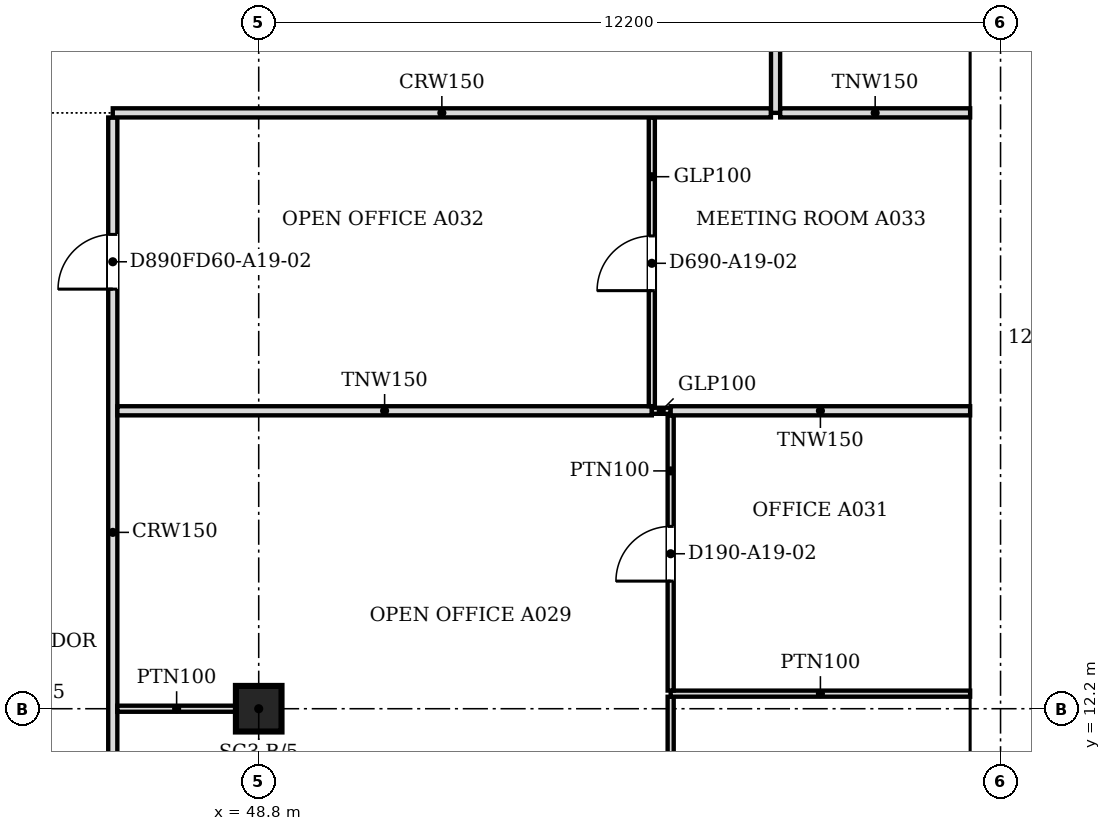
"""IFC4 building model, lengths in metres.
Left out: names, types, materials, properties, quantities, classifications, styles, units other than length and angle.
Written with IfcOpenShell. Run it as: python <this file> out.ifc"""

import sys

from ifc_helpers import new_model, si_unit, direction, frame, frame_2d, origin, origin_2d, place, context, subcontext, project, spatial, polyline, rectangle, outline, extrude, faceted_brep, source, transform, mapped, element, fill, save


model = new_model("IFC4")
c1 = context("Model", 3, precision=1e-05, world=origin(), true_north=direction((0.0, 1.0)))
c2 = subcontext(c1, "Body", "Model", "MODEL_VIEW")
j1 = project(units=[si_unit("LENGTHUNIT", "METRE"), si_unit("PLANEANGLEUNIT", "RADIAN")], contexts=[c1])
p1 = place(None, origin())
s1 = spatial("IfcSite", under=j1, at=p1, CompositionType="ELEMENT")
p2 = place(p1, origin())
s2 = spatial("IfcBuilding", under=s1, at=p2, CompositionType="ELEMENT")
p3 = place(p2, frame((0.0, 0.0, 216.9)))
s3 = spatial("IfcBuildingStorey", under=s2, at=p3, CompositionType="ELEMENT", Elevation=216.9)
p4 = place(p3, frame((48.8, 12.2, 0.0), z_axis=(0.0, 0.0, 1.0), x_axis=(1.0, 0.0, 0.0)))
e1 = element("IfcColumn", 1, at=p4, inside=s3, PredefinedType="COLUMN", context=c2, shape_type="SweptSolid", body=[
    extrude(rectangle(XDim=0.75, YDim=0.75, at=origin_2d()), origin(), (0.0, 0.0, 1.0), 3.6),
])
m1 = source(origin(), c2, "Body", "SweptSolid", [
    extrude(outline(polyline([(3.05, 0.0), (6.1, 3.8), (3.05, 7.6), (0.0, 3.8), (3.05, 0.0)])), frame((0.0, 0.25, 0.0), z_axis=(0.0, -1.0, 0.0), x_axis=(1.0, 0.0, 0.0)), (0.0, 0.0, 1.0), 0.5),
])
p5 = place(p3, frame((60.75, 9.15, -3.8), z_axis=(0.0, 0.0, 1.0), x_axis=(0.0, 1.0, 0.0)))
e2 = element("IfcWall", 2, at=p5, inside=s3, PredefinedType="SOLIDWALL", context=c2, shape_type="MappedRepresentation", body=[
    mapped(m1, transform((0.0, 0.0, 0.0), scale=1.0)),
])
m2 = source(origin(), c2, "Body", "SweptSolid", [
    extrude(outline(polyline([(3.05, 0.399), (5.78, 3.8), (3.05, 7.2), (0.321, 3.8), (3.05, 0.399)])), frame((0.0, 0.26, 0.0), z_axis=(0.0, -1.0, 0.0), x_axis=(1.0, 0.0, 0.0)), (0.0, 0.0, 1.0), 0.52),
])
p6 = place(p5, origin())
e3 = element("IfcOpeningElement", 3, at=p6, cuts=e2, PredefinedType="OPENING", context=c2, shape_type="MappedRepresentation", body=[
    mapped(m2, transform((0.0, 0.0, 0.0), scale=1.0)),
])
p7 = place(p3, frame((60.75, 15.25, -3.8), z_axis=(0.0, 0.0, 1.0), x_axis=(0.0, 1.0, 0.0)))
e4 = element("IfcWall", 4, at=p7, inside=s3, PredefinedType="SOLIDWALL", context=c2, shape_type="MappedRepresentation", body=[
    mapped(m1, transform((0.0, 0.0, 0.0), scale=1.0)),
])
p8 = place(p7, origin())
e5 = element("IfcOpeningElement", 5, at=p8, cuts=e4, PredefinedType="OPENING", context=c2, shape_type="MappedRepresentation", body=[
    mapped(m2, transform((0.0, 0.0, 0.0), scale=1.0)),
])
m3 = source(origin(), c2, "Body", "Brep", [
    faceted_brep([(3.05, -0.25, 0.0), (6.1, -0.25, 3.8), (6.1, -0.25, 3.8), (3.05, -0.25, 7.6), (0.0, -0.25, 3.8), (0.0, 0.25, 3.8), (3.05, 0.25, 7.6), (6.1, 0.25, 3.8), (6.1, 0.25, 3.8), (3.05, 0.25, 0.0)], [[[0, 1, 2, 3, 4]], [[5, 6, 7, 8, 9]], [[9, 8, 1, 0]], [[7, 6, 3, 2]], [[6, 5, 4, 3]], [[5, 9, 0, 4]], [[1, 8, 7, 2]]]),
])
p9 = place(p3, frame((60.75, 21.35, -3.8), z_axis=(0.0, 0.0, 1.0), x_axis=(0.0, 1.0, 0.0)))
e6 = element("IfcWall", 6, at=p9, inside=s3, PredefinedType="SOLIDWALL", context=c2, shape_type="MappedRepresentation", body=[
    mapped(m3, transform((0.0, 0.0, 0.0), scale=1.0)),
])
p10 = place(p9, origin())
e7 = element("IfcOpeningElement", 7, at=p10, cuts=e6, PredefinedType="OPENING", context=c2, shape_type="MappedRepresentation", body=[
    mapped(m2, transform((0.0, 0.0, 0.0), scale=1.0)),
])
p11 = place(p2, frame((0.0, 0.0, 220.7)))
s4 = spatial("IfcBuildingStorey", under=s2, at=p11, CompositionType="ELEMENT", Elevation=220.7)
m4 = source(origin(), c2, "Body", "Brep", [
    faceted_brep([(3.003, -0.25, 0.0), (6.053, -0.25, 3.8), (3.003, -0.25, 7.6), (0.0, -0.25, 3.8), (0.047, 0.25, 3.859), (3.003, 0.25, 7.6), (6.053, 0.25, 3.8), (3.003, 0.25, 0.0), (0.047, 0.25, 3.741), (0.0, 0.0, 3.8)], [[[0, 1, 2, 3]], [[4, 5, 6, 7, 8]], [[7, 6, 1, 0]], [[6, 5, 2, 1]], [[5, 4, 9, 3, 2]], [[8, 7, 0, 3, 9]], [[8, 9, 4]]]),
])
p12 = place(p11, frame((60.75, 6.146, -3.8), z_axis=(0.0, 0.0, 1.0), x_axis=(0.0, 1.0, 0.0)))
e8 = element("IfcWall", 8, at=p12, inside=s4, PredefinedType="SOLIDWALL", context=c2, shape_type="MappedRepresentation", body=[
    mapped(m4, transform((0.0, 0.0, 0.0), scale=1.0)),
])
m5 = source(origin(), c2, "Body", "SweptSolid", [
    extrude(outline(polyline([(3.005, 0.401), (5.733, 3.8), (3.005, 7.199), (0.319, 3.8), (3.005, 0.401)])), frame((0.0, 0.26, 0.0), z_axis=(0.0, -1.0, 0.0), x_axis=(1.0, 0.0, 0.0)), (0.0, 0.0, 1.0), 0.52),
])
p13 = place(p12, origin())
e9 = element("IfcOpeningElement", 9, at=p13, cuts=e8, PredefinedType="OPENING", context=c2, shape_type="MappedRepresentation", body=[
    mapped(m5, transform((0.0, 0.0, 0.0), scale=1.0)),
])
m6 = source(origin(), c2, "Body", "SweptSolid", [
    extrude(outline(polyline([(3.05, 0.0), (6.1, 3.8), (3.05, 7.6), (0.0, 3.8), (3.05, 0.0)])), frame((0.0, 0.25, 0.0), z_axis=(0.0, -1.0, 0.0), x_axis=(1.0, 0.0, 0.0)), (0.0, 0.0, 1.0), 0.5),
])
p14 = place(p11, frame((60.75, 12.2, -3.8), z_axis=(0.0, 0.0, 1.0), x_axis=(0.0, 1.0, 0.0)))
e10 = element("IfcWall", 10, at=p14, inside=s4, PredefinedType="SOLIDWALL", context=c2, shape_type="MappedRepresentation", body=[
    mapped(m6, transform((0.0, 0.0, 0.0), scale=1.0)),
])
m7 = source(origin(), c2, "Body", "SweptSolid", [
    extrude(outline(polyline([(3.05, 0.399), (5.78, 3.8), (3.05, 7.201), (0.321, 3.8), (3.05, 0.399)])), frame((0.0, 0.26, 0.0), z_axis=(0.0, -1.0, 0.0), x_axis=(1.0, 0.0, 0.0)), (0.0, 0.0, 1.0), 0.52),
])
p15 = place(p14, origin())
e11 = element("IfcOpeningElement", 11, at=p15, cuts=e10, PredefinedType="OPENING", context=c2, shape_type="MappedRepresentation", body=[
    mapped(m7, transform((0.0, 0.0, 0.0), scale=1.0)),
])
m8 = source(origin(), c2, "Body", "Brep", [
    faceted_brep([(3.05, -0.25, 0.0), (6.1, -0.25, 3.8), (6.1, -0.25, 3.8), (3.05, -0.25, 7.6), (0.0, -0.25, 3.8), (0.0, 0.25, 3.8), (3.05, 0.25, 7.6), (6.1, 0.25, 3.8), (6.1, 0.25, 3.8), (3.05, 0.25, 0.0)], [[[0, 1, 2, 3, 4]], [[5, 6, 7, 8, 9]], [[9, 8, 1, 0]], [[7, 6, 3, 2]], [[6, 5, 4, 3]], [[5, 9, 0, 4]], [[1, 8, 7, 2]]]),
])
p16 = place(p11, frame((60.75, 18.3, -3.8), z_axis=(0.0, 0.0, 1.0), x_axis=(0.0, 1.0, 0.0)))
e12 = element("IfcWall", 12, at=p16, inside=s4, PredefinedType="SOLIDWALL", context=c2, shape_type="MappedRepresentation", body=[
    mapped(m8, transform((0.0, 0.0, 0.0), scale=1.0)),
])
p17 = place(p16, origin())
e13 = element("IfcOpeningElement", 13, at=p17, cuts=e12, PredefinedType="OPENING", context=c2, shape_type="MappedRepresentation", body=[
    mapped(m7, transform((0.0, 0.0, 0.0), scale=1.0)),
])
p18 = place(p3, frame((46.4, 21.924, 0.0), z_axis=(0.0, 0.0, 1.0), x_axis=(0.0, -1.0, 0.0)))
e14 = element("IfcWall", 14, at=p18, inside=s3, PredefinedType="PARTITIONING", context=c2, shape_type="SweptSolid", body=[
    extrude(rectangle(XDim=17.724, YDim=0.15, at=frame_2d((8.862, 0.0))), origin(), (0.0, 0.0, 1.0), 3.067),
])
m9 = source(origin(), c2, "Body", "SweptSolid", [
    extrude(rectangle(XDim=0.9, YDim=2.1, at=frame_2d((0.45, 1.05))), frame((0.0, 0.085, 0.0), z_axis=(0.0, -1.0, 0.0), x_axis=(1.0, 0.0, 0.0)), (0.0, 0.0, 1.0), 0.17),
])
p19 = place(p18, frame((1.923, 0.0, 0.0)))
e15 = element("IfcOpeningElement", 15, at=p19, cuts=e14, PredefinedType="OPENING", context=c2, shape_type="MappedRepresentation", body=[
    mapped(m9, transform((0.0, 0.0, 0.0), scale=1.0)),
])
p20 = place(p18, frame((10.824, 0.0, 0.0)))
e16 = element("IfcOpeningElement", 16, at=p20, cuts=e14, PredefinedType="OPENING", context=c2, shape_type="MappedRepresentation", body=[
    mapped(m9, transform((0.0, 0.0, 0.0), scale=1.0)),
])
p21 = place(p3, frame((55.575, 12.397, 0.0), z_axis=(0.0, 0.0, 1.0), x_axis=(0.0, -1.0, 0.0)))
e17 = element("IfcWall", 17, at=p21, inside=s3, PredefinedType="PARTITIONING", context=c2, shape_type="SweptSolid", body=[
    extrude(rectangle(XDim=4.297, YDim=0.1, at=frame_2d((2.148, 0.0))), origin(), (0.0, 0.0, 1.0), 3.067),
])
m10 = source(origin(), c2, "Body", "SweptSolid", [
    extrude(rectangle(XDim=0.9, YDim=2.1, at=frame_2d((0.45, 1.05))), frame((0.0, 0.06, 0.0), z_axis=(0.0, -1.0, 0.0), x_axis=(1.0, 0.0, 0.0)), (0.0, 0.0, 1.0), 0.12),
])
p22 = place(p21, frame((1.697, 0.0, 0.0)))
e18 = element("IfcOpeningElement", 18, at=p22, cuts=e17, PredefinedType="OPENING", context=c2, shape_type="MappedRepresentation", body=[
    mapped(m10, transform((0.0, 0.0, 0.0), scale=1.0)),
])
p23 = place(p3, frame((48.425, 12.2, 0.0), z_axis=(0.0, 0.0, 1.0), x_axis=(-1.0, 0.0, 0.0)))
e19 = element("IfcWall", 19, at=p23, inside=s3, PredefinedType="PARTITIONING", context=c2, shape_type="SweptSolid", body=[
    extrude(rectangle(XDim=1.95, YDim=0.1, at=frame_2d((0.975, 0.0))), origin(), (0.0, 0.0, 1.0), 3.067),
])
p24 = place(p3, frame((55.575, 12.448, 0.0), z_axis=(0.0, 0.0, 1.0), x_axis=(1.0, 0.0, 0.0)))
e20 = element("IfcWall", 20, at=p24, inside=s3, PredefinedType="PARTITIONING", context=c2, shape_type="SweptSolid", body=[
    extrude(rectangle(XDim=4.925, YDim=0.1, at=frame_2d((2.462, 0.0))), origin(), (0.0, 0.0, 1.0), 3.067),
])
p25 = place(p3, frame((55.575, 17.024, 0.0), z_axis=(0.0, 0.0, 1.0), x_axis=(0.0, -1.0, 0.0)))
e21 = element("IfcWall", 21, at=p25, inside=s3, PredefinedType="PARTITIONING", context=c2, shape_type="SweptSolid", body=[
    extrude(rectangle(XDim=4.525, YDim=0.1, at=frame_2d((2.263, 0.0))), origin(), (0.0, 0.0, 1.0), 3.067),
])
p26 = place(p25, frame((1.825, 0.0, 0.0)))
e22 = element("IfcOpeningElement", 22, at=p26, cuts=e21, PredefinedType="OPENING", context=c2, shape_type="MappedRepresentation", body=[
    mapped(m10, transform((0.0, 0.0, 0.0), scale=1.0)),
])
p27 = place(p3, frame((46.476, 17.1, 0.0), z_axis=(0.0, 0.0, 1.0), x_axis=(1.0, 0.0, 0.0)))
e23 = element("IfcWall", 23, at=p27, inside=s3, PredefinedType="PARTITIONING", context=c2, shape_type="SweptSolid", body=[
    extrude(rectangle(XDim=8.789, YDim=0.15, at=frame_2d((4.395, 0.0))), origin(), (0.0, 0.0, 1.0), 3.067),
])
p28 = place(p3, frame((55.266, 17.1, 0.0), z_axis=(0.0, 0.0, 1.0), x_axis=(1.0, 0.0, 0.0)))
e24 = element("IfcWall", 24, at=p28, inside=s3, PredefinedType="PARTITIONING", context=c2, shape_type="SweptSolid", body=[
    extrude(rectangle(XDim=0.308, YDim=0.1, at=frame_2d((0.154, 0.0))), origin(), (0.0, 0.0, 1.0), 3.067),
])
p29 = place(p3, frame((55.575, 17.1, 0.0), z_axis=(0.0, 0.0, 1.0), x_axis=(1.0, 0.0, 0.0)))
e25 = element("IfcWall", 25, at=p29, inside=s3, PredefinedType="PARTITIONING", context=c2, shape_type="SweptSolid", body=[
    extrude(rectangle(XDim=4.925, YDim=0.15, at=frame_2d((2.462, 0.0))), origin(), (0.0, 0.0, 1.0), 3.067),
])
p30 = place(p3, frame((55.265, 21.924, 0.0), z_axis=(0.0, 0.0, 1.0), x_axis=(0.0, -1.0, 0.0)))
e26 = element("IfcWall", 26, at=p30, inside=s3, PredefinedType="PARTITIONING", context=c2, shape_type="SweptSolid", body=[
    extrude(rectangle(XDim=4.748, YDim=0.1, at=frame_2d((2.374, 0.0))), origin(), (0.0, 0.0, 1.0), 3.067),
])
p31 = place(p30, frame((1.948, 0.0, 0.0)))
e27 = element("IfcOpeningElement", 27, at=p31, cuts=e26, PredefinedType="OPENING", context=c2, shape_type="MappedRepresentation", body=[
    mapped(m10, transform((0.0, 0.0, 0.0), scale=1.0)),
])
p32 = place(p3, frame((46.4, 22.0, 0.0), z_axis=(0.0, 0.0, 1.0), x_axis=(1.0, 0.0, 0.0)))
e28 = element("IfcWall", 28, at=p32, inside=s3, PredefinedType="PARTITIONING", context=c2, shape_type="SweptSolid", body=[
    extrude(rectangle(XDim=10.824, YDim=0.15, at=frame_2d((5.412, 0.0))), origin(), (0.0, 0.0, 1.0), 3.067),
])
p33 = place(p3, frame((57.3, 30.6, 0.0), z_axis=(0.0, 0.0, 1.0), x_axis=(0.0, -1.0, 0.0)))
e29 = element("IfcWall", 29, at=p33, inside=s3, PredefinedType="PARTITIONING", context=c2, shape_type="SweptSolid", body=[
    extrude(rectangle(XDim=8.6, YDim=0.15, at=frame_2d((4.3, 0.0))), origin(), (0.0, 0.0, 1.0), 3.067),
])
p34 = place(p33, frame((3.9, 0.0, 0.0)))
e30 = element("IfcOpeningElement", 30, at=p34, cuts=e29, PredefinedType="OPENING", context=c2, shape_type="MappedRepresentation", body=[
    mapped(m9, transform((0.0, 0.0, 0.0), scale=1.0)),
])
p35 = place(p3, frame((57.376, 22.0, 0.0), z_axis=(0.0, 0.0, 1.0), x_axis=(1.0, 0.0, 0.0)))
e31 = element("IfcWall", 31, at=p35, inside=s3, PredefinedType="PARTITIONING", context=c2, shape_type="SweptSolid", body=[
    extrude(rectangle(XDim=3.124, YDim=0.15, at=frame_2d((1.562, 0.0))), origin(), (0.0, 0.0, 1.0), 3.067),
])
m11 = source(origin(), c2, "Body", "SweptSolid", [
    extrude(rectangle(XDim=0.9, YDim=2.1, at=frame_2d((0.45, 1.05))), frame((0.0, 0.025, 0.0), z_axis=(0.0, -1.0, 0.0), x_axis=(1.0, 0.0, 0.0)), (0.0, 0.0, 1.0), 0.05),
])
p36 = place(p26, origin())
e32 = element("IfcDoor", 32, at=p36, inside=s3, OperationType="SINGLE_SWING_RIGHT", PredefinedType="DOOR", context=c2, shape_type="MappedRepresentation", body=[
    mapped(m11, transform((0.0, 0.0, 0.0), scale=1.0)),
])
fill(e22, e32)
p37 = place(p31, origin())
e33 = element("IfcDoor", 33, at=p37, inside=s3, OperationType="SINGLE_SWING_RIGHT", PredefinedType="DOOR", context=c2, shape_type="MappedRepresentation", body=[
    mapped(m11, transform((0.0, 0.0, 0.0), scale=1.0)),
])
fill(e27, e33)
p38 = place(p19, origin())
e34 = element("IfcDoor", 34, at=p38, inside=s3, OperationType="SINGLE_SWING_RIGHT", PredefinedType="DOOR", context=c2, shape_type="MappedRepresentation", body=[
    mapped(m11, transform((0.0, 0.0, 0.0), scale=1.0)),
])
fill(e15, e34)
save(model, sys.argv[1])
